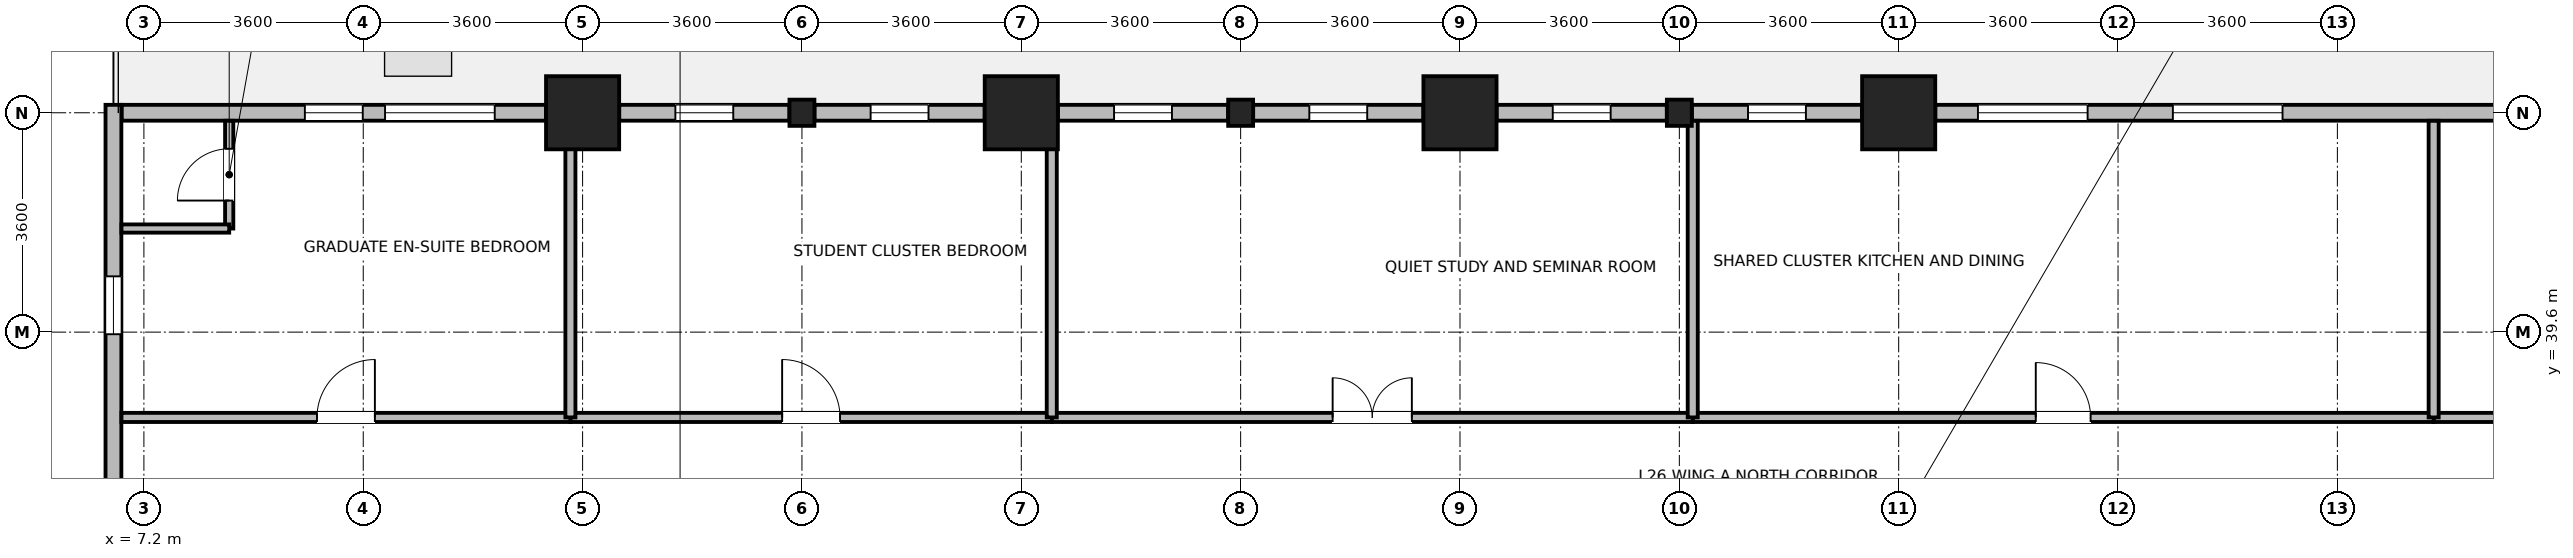
"""IFC4 building model, lengths in metres.
Left out: names, types, materials, properties, quantities, classifications, styles, units other than length and angle.
Written with IfcOpenShell. Run it as: python <this file> out.ifc"""

import sys

from ifc_helpers import new_model, si_unit, direction, frame, frame_2d, origin, origin_2d, place, context, subcontext, project, spatial, rectangle, i_section, extrude, source, transform, mapped, element, fill, save


model = new_model("IFC4")
c1 = context("Model", 3, precision=1e-05, world=origin(), true_north=direction((0.0, 1.0)))
c2 = subcontext(c1, "Body", "Model", "MODEL_VIEW")
j1 = project(units=[si_unit("LENGTHUNIT", "METRE"), si_unit("PLANEANGLEUNIT", "RADIAN")], contexts=[c1])
p1 = place(None, origin())
s1 = spatial("IfcSite", under=j1, at=p1, CompositionType="ELEMENT")
p2 = place(p1, origin())
s2 = spatial("IfcBuilding", under=s1, at=p2, CompositionType="ELEMENT")
p3 = place(p2, frame((0.0, 0.0, 104.5)))
s3 = spatial("IfcBuildingStorey", under=s2, at=p3, CompositionType="ELEMENT", Elevation=104.5)
m1 = source(origin(), c2, "Body", "SweptSolid", [
    extrude(rectangle(XDim=1.2, YDim=1.2, at=origin_2d()), origin(), (0.0, 0.0, 1.0), 3.7),
])
for number, where, z_axis, x_axis in (
    (1, (14.4, 43.2, 0.0), (0.0, 0.0, 1.0), (1.0, 0.0, 0.0)),
    (2, (21.6, 43.2, 0.0), (0.0, 0.0, 1.0), (1.0, 0.0, 0.0)),
    (3, (28.8, 43.2, 0.0), (0.0, 0.0, 1.0), (1.0, 0.0, 0.0)),
    (4, (36.0, 43.2, 0.0), (0.0, 0.0, 1.0), (1.0, 0.0, 0.0)),
):
    element("IfcColumn", number, at=place(p3, frame(where, z_axis=z_axis, x_axis=x_axis)), inside=s3, PredefinedType="COLUMN", context=c2, shape_type="MappedRepresentation", body=[
        mapped(m1, transform((0.0, 0.0, 0.0), x_axis=(1.0, 0.0, 0.0), y_axis=(0.0, 1.0, 0.0), z_axis=(0.0, 0.0, 1.0), scale=1.0)),
    ])
m2 = source(origin(), c2, "Body", "SweptSolid", [
    extrude(i_section(OverallWidth=0.409, OverallDepth=0.43, WebThickness=0.024, FlangeThickness=0.033, FilletRadius=0.015, at=origin_2d()), origin(), (0.0, 0.0, 1.0), 3.7),
])
for number, where, z_axis, x_axis in (
    (5, (18.0, 43.2, 0.0), (0.0, 0.0, 1.0), (1.0, 0.0, 0.0)),
    (6, (25.2, 43.2, 0.0), (0.0, 0.0, 1.0), (1.0, 0.0, 0.0)),
    (7, (32.4, 43.2, 0.0), (0.0, 0.0, 1.0), (1.0, 0.0, 0.0)),
):
    element("IfcColumn", number, at=place(p3, frame(where, z_axis=z_axis, x_axis=x_axis)), inside=s3, PredefinedType="COLUMN", context=c2, shape_type="MappedRepresentation", body=[
        mapped(m2, transform((0.0, 0.0, 0.0), x_axis=(1.0, 0.0, 0.0), y_axis=(0.0, 1.0, 0.0), z_axis=(0.0, 0.0, 1.0), scale=1.0)),
    ])
p4 = place(p3, frame((36.601, 43.2, 0.0), z_axis=(0.0, 0.0, 1.0), x_axis=(1.0, 0.0, 0.0)))
e8 = element("IfcWall", 8, at=p4, inside=s3, PredefinedType="STANDARD", context=c2, shape_type="SweptSolid", body=[
    extrude(rectangle(XDim=9.598, YDim=0.26, at=frame_2d((4.799, 0.0))), origin(), (0.0, 0.0, 1.0), 2.98),
])
p5 = place(p4, frame((0.7, 0.0, 0.85)))
e9 = element("IfcOpeningElement", 9, at=p5, cuts=e8, PredefinedType="OPENING", context=c2, shape_type="SweptSolid", body=[
    extrude(rectangle(XDim=1.8, YDim=1.85, at=frame_2d((0.9, 0.925))), frame((0.0, 0.14, 0.0), z_axis=(0.0, -1.0, 0.0), x_axis=(1.0, 0.0, 0.0)), (0.0, 0.0, 1.0), 0.28),
])
p6 = place(p4, frame((3.899, 0.0, 0.85)))
e10 = element("IfcOpeningElement", 10, at=p6, cuts=e8, PredefinedType="OPENING", context=c2, shape_type="SweptSolid", body=[
    extrude(rectangle(XDim=1.8, YDim=1.85, at=frame_2d((0.9, 0.925))), frame((0.0, 0.14, 0.0), z_axis=(0.0, -1.0, 0.0), x_axis=(1.0, 0.0, 0.0)), (0.0, 0.0, 1.0), 0.28),
])
p7 = place(p3, frame((32.605, 43.2, 0.0), z_axis=(0.0, 0.0, 1.0), x_axis=(1.0, 0.0, 0.0)))
e11 = element("IfcWall", 11, at=p7, inside=s3, PredefinedType="STANDARD", context=c2, shape_type="SweptSolid", body=[
    extrude(rectangle(XDim=2.793, YDim=0.26, at=frame_2d((1.397, 0.0))), origin(), (0.0, 0.0, 1.0), 2.98),
])
p8 = place(p7, frame((0.922, 0.0, 0.85)))
e12 = element("IfcOpeningElement", 12, at=p8, cuts=e11, PredefinedType="OPENING", context=c2, shape_type="SweptSolid", body=[
    extrude(rectangle(XDim=0.95, YDim=1.75, at=frame_2d((0.475, 0.875))), frame((0.0, 0.14, 0.0), z_axis=(0.0, -1.0, 0.0), x_axis=(1.0, 0.0, 0.0)), (0.0, 0.0, 1.0), 0.28),
])
p9 = place(p3, frame((29.401, 43.2, 0.0), z_axis=(0.0, 0.0, 1.0), x_axis=(1.0, 0.0, 0.0)))
e13 = element("IfcWall", 13, at=p9, inside=s3, PredefinedType="STANDARD", context=c2, shape_type="SweptSolid", body=[
    extrude(rectangle(XDim=2.794, YDim=0.26, at=frame_2d((1.397, 0.0))), origin(), (0.0, 0.0, 1.0), 2.98),
])
p10 = place(p9, frame((0.922, 0.0, 0.85)))
e14 = element("IfcOpeningElement", 14, at=p10, cuts=e13, PredefinedType="OPENING", context=c2, shape_type="SweptSolid", body=[
    extrude(rectangle(XDim=0.95, YDim=1.75, at=frame_2d((0.475, 0.875))), frame((0.0, 0.14, 0.0), z_axis=(0.0, -1.0, 0.0), x_axis=(1.0, 0.0, 0.0)), (0.0, 0.0, 1.0), 0.28),
])
p11 = place(p3, frame((25.406, 43.2, 0.0), z_axis=(0.0, 0.0, 1.0), x_axis=(1.0, 0.0, 0.0)))
e15 = element("IfcWall", 15, at=p11, inside=s3, PredefinedType="STANDARD", context=c2, shape_type="SweptSolid", body=[
    extrude(rectangle(XDim=2.793, YDim=0.26, at=frame_2d((1.397, 0.0))), origin(), (0.0, 0.0, 1.0), 2.98),
])
p12 = place(p11, frame((0.922, 0.0, 0.85)))
e16 = element("IfcOpeningElement", 16, at=p12, cuts=e15, PredefinedType="OPENING", context=c2, shape_type="SweptSolid", body=[
    extrude(rectangle(XDim=0.95, YDim=1.75, at=frame_2d((0.475, 0.875))), frame((0.0, 0.14, 0.0), z_axis=(0.0, -1.0, 0.0), x_axis=(1.0, 0.0, 0.0)), (0.0, 0.0, 1.0), 0.28),
])
p13 = place(p3, frame((22.201, 43.2, 0.0), z_axis=(0.0, 0.0, 1.0), x_axis=(1.0, 0.0, 0.0)))
e17 = element("IfcWall", 17, at=p13, inside=s3, PredefinedType="STANDARD", context=c2, shape_type="SweptSolid", body=[
    extrude(rectangle(XDim=2.793, YDim=0.26, at=frame_2d((1.397, 0.0))), origin(), (0.0, 0.0, 1.0), 2.98),
])
p14 = place(p13, frame((0.922, 0.0, 0.85)))
e18 = element("IfcOpeningElement", 18, at=p14, cuts=e17, PredefinedType="OPENING", context=c2, shape_type="SweptSolid", body=[
    extrude(rectangle(XDim=0.95, YDim=1.75, at=frame_2d((0.475, 0.875))), frame((0.0, 0.14, 0.0), z_axis=(0.0, -1.0, 0.0), x_axis=(1.0, 0.0, 0.0)), (0.0, 0.0, 1.0), 0.28),
])
p15 = place(p3, frame((18.206, 43.2, 0.0), z_axis=(0.0, 0.0, 1.0), x_axis=(1.0, 0.0, 0.0)))
e19 = element("IfcWall", 19, at=p15, inside=s3, PredefinedType="STANDARD", context=c2, shape_type="SweptSolid", body=[
    extrude(rectangle(XDim=2.793, YDim=0.26, at=frame_2d((1.397, 0.0))), origin(), (0.0, 0.0, 1.0), 2.98),
])
p16 = place(p15, frame((0.922, 0.0, 0.85)))
e20 = element("IfcOpeningElement", 20, at=p16, cuts=e19, PredefinedType="OPENING", context=c2, shape_type="SweptSolid", body=[
    extrude(rectangle(XDim=0.95, YDim=1.75, at=frame_2d((0.475, 0.875))), frame((0.0, 0.14, 0.0), z_axis=(0.0, -1.0, 0.0), x_axis=(1.0, 0.0, 0.0)), (0.0, 0.0, 1.0), 0.28),
])
p17 = place(p3, frame((15.001, 43.2, 0.0), z_axis=(0.0, 0.0, 1.0), x_axis=(1.0, 0.0, 0.0)))
e21 = element("IfcWall", 21, at=p17, inside=s3, PredefinedType="STANDARD", context=c2, shape_type="SweptSolid", body=[
    extrude(rectangle(XDim=2.793, YDim=0.26, at=frame_2d((1.397, 0.0))), origin(), (0.0, 0.0, 1.0), 2.98),
])
p18 = place(p17, frame((0.922, 0.0, 0.85)))
e22 = element("IfcOpeningElement", 22, at=p18, cuts=e21, PredefinedType="OPENING", context=c2, shape_type="SweptSolid", body=[
    extrude(rectangle(XDim=0.95, YDim=1.75, at=frame_2d((0.475, 0.875))), frame((0.0, 0.14, 0.0), z_axis=(0.0, -1.0, 0.0), x_axis=(1.0, 0.0, 0.0)), (0.0, 0.0, 1.0), 0.28),
])
p19 = place(p3, frame((6.835, 43.2, 0.0), z_axis=(0.0, 0.0, 1.0), x_axis=(1.0, 0.0, 0.0)))
e23 = element("IfcWall", 23, at=p19, inside=s3, PredefinedType="STANDARD", context=c2, shape_type="SweptSolid", body=[
    extrude(rectangle(XDim=6.964, YDim=0.26, at=frame_2d((3.482, 0.0))), origin(), (0.0, 0.0, 1.0), 3.43),
])
p20 = place(p19, frame((4.323, 0.0, 0.85)))
e24 = element("IfcOpeningElement", 24, at=p20, cuts=e23, PredefinedType="OPENING", context=c2, shape_type="SweptSolid", body=[
    extrude(rectangle(XDim=1.8, YDim=1.85, at=frame_2d((0.9, 0.925))), frame((0.0, 0.14, 0.0), z_axis=(0.0, -1.0, 0.0), x_axis=(1.0, 0.0, 0.0)), (0.0, 0.0, 1.0), 0.28),
])
p21 = place(p19, frame((3.007, 0.0, 0.85)))
e25 = element("IfcOpeningElement", 25, at=p21, cuts=e23, PredefinedType="OPENING", context=c2, shape_type="SweptSolid", body=[
    extrude(rectangle(XDim=0.95, YDim=1.75, at=frame_2d((0.475, 0.875))), frame((0.0, 0.14, 0.0), z_axis=(0.0, -1.0, 0.0), x_axis=(1.0, 0.0, 0.0)), (0.0, 0.0, 1.0), 0.28),
])
p22 = place(p3, frame((6.7, 36.751, 0.0), z_axis=(0.0, 0.0, 1.0), x_axis=(0.0, 1.0, 0.0)))
e26 = element("IfcWall", 26, at=p22, inside=s3, PredefinedType="STANDARD", context=c2, shape_type="SweptSolid", body=[
    extrude(rectangle(XDim=6.579, YDim=0.26, at=frame_2d((3.29, 0.0))), origin(), (0.0, 0.0, 1.0), 3.43),
])
p23 = place(p22, frame((2.814, 0.0, 0.85)))
e27 = element("IfcOpeningElement", 27, at=p23, cuts=e26, PredefinedType="OPENING", context=c2, shape_type="SweptSolid", body=[
    extrude(rectangle(XDim=0.95, YDim=1.75, at=frame_2d((0.475, 0.875))), frame((0.0, 0.14, 0.0), z_axis=(0.0, -1.0, 0.0), x_axis=(1.0, 0.0, 0.0)), (0.0, 0.0, 1.0), 0.28),
])
p24 = place(p3, frame((8.6, 41.3, 0.0), z_axis=(0.0, 0.0, 1.0), x_axis=(0.0, 1.0, 0.0)))
e28 = element("IfcWall", 28, at=p24, inside=s3, PredefinedType="PARTITIONING", context=c2, shape_type="SweptSolid", body=[
    extrude(rectangle(XDim=1.768, YDim=0.135, at=frame_2d((0.884, 0.0))), origin(), (0.0, 0.0, 1.0), 3.43),
])
p25 = place(p24, frame((0.459, 0.0, 0.0)))
e29 = element("IfcOpeningElement", 29, at=p25, cuts=e28, PredefinedType="OPENING", context=c2, shape_type="SweptSolid", body=[
    extrude(rectangle(XDim=0.85, YDim=2.04, at=frame_2d((0.425, 1.02))), frame((0.0, 0.078, 0.0), z_axis=(0.0, -1.0, 0.0), x_axis=(1.0, 0.0, 0.0)), (0.0, 0.0, 1.0), 0.155),
])
p26 = place(p3, frame((6.832, 41.3, 0.0), z_axis=(0.0, 0.0, 1.0), x_axis=(1.0, 0.0, 0.0)))
e30 = element("IfcWall", 30, at=p26, inside=s3, PredefinedType="PARTITIONING", context=c2, shape_type="SweptSolid", body=[
    extrude(rectangle(XDim=1.768, YDim=0.135, at=frame_2d((0.884, 0.0))), origin(), (0.0, 0.0, 1.0), 3.43),
])
p27 = place(p3, frame((44.78, 38.2, 0.0), z_axis=(0.0, 0.0, 1.0), x_axis=(1.0, 0.0, 0.0)))
e31 = element("IfcWall", 31, at=p27, inside=s3, PredefinedType="PARTITIONING", context=c2, shape_type="SweptSolid", body=[
    extrude(rectangle(XDim=14.06, YDim=0.15, at=frame_2d((7.03, 0.0))), origin(), (0.0, 0.0, 1.0), 3.43),
])
p28 = place(p27, frame((6.38, 0.0, 0.0)))
e32 = element("IfcOpeningElement", 32, at=p28, cuts=e31, PredefinedType="OPENING", context=c2, shape_type="SweptSolid", body=[
    extrude(rectangle(XDim=1.3, YDim=2.12, at=frame_2d((0.65, 1.06))), frame((0.0, 0.085, 0.0), z_axis=(0.0, -1.0, 0.0), x_axis=(1.0, 0.0, 0.0)), (0.0, 0.0, 1.0), 0.17),
])
p29 = place(p3, frame((32.62, 38.2, 0.0), z_axis=(0.0, 0.0, 1.0), x_axis=(1.0, 0.0, 0.0)))
e33 = element("IfcWall", 33, at=p29, inside=s3, PredefinedType="PARTITIONING", context=c2, shape_type="SweptSolid", body=[
    extrude(rectangle(XDim=12.16, YDim=0.15, at=frame_2d((6.08, 0.0))), origin(), (0.0, 0.0, 1.0), 3.43),
])
p30 = place(p29, frame((5.63, 0.0, 0.0)))
e34 = element("IfcOpeningElement", 34, at=p30, cuts=e33, PredefinedType="OPENING", context=c2, shape_type="SweptSolid", body=[
    extrude(rectangle(XDim=0.9, YDim=2.08, at=frame_2d((0.45, 1.04))), frame((0.0, 0.085, 0.0), z_axis=(0.0, -1.0, 0.0), x_axis=(1.0, 0.0, 0.0)), (0.0, 0.0, 1.0), 0.17),
])
p31 = place(p3, frame((22.1, 38.2, 0.0), z_axis=(0.0, 0.0, 1.0), x_axis=(1.0, 0.0, 0.0)))
e35 = element("IfcWall", 35, at=p31, inside=s3, PredefinedType="PARTITIONING", context=c2, shape_type="SweptSolid", body=[
    extrude(rectangle(XDim=10.52, YDim=0.15, at=frame_2d((5.26, 0.0))), origin(), (0.0, 0.0, 1.0), 3.43),
])
p32 = place(p31, frame((4.61, 0.0, 0.0)))
e36 = element("IfcOpeningElement", 36, at=p32, cuts=e35, PredefinedType="OPENING", context=c2, shape_type="SweptSolid", body=[
    extrude(rectangle(XDim=1.3, YDim=2.12, at=frame_2d((0.65, 1.06))), frame((0.0, 0.085, 0.0), z_axis=(0.0, -1.0, 0.0), x_axis=(1.0, 0.0, 0.0)), (0.0, 0.0, 1.0), 0.17),
])
p33 = place(p3, frame((14.2, 38.2, 0.0), z_axis=(0.0, 0.0, 1.0), x_axis=(1.0, 0.0, 0.0)))
e37 = element("IfcWall", 37, at=p33, inside=s3, PredefinedType="PARTITIONING", context=c2, shape_type="SweptSolid", body=[
    extrude(rectangle(XDim=7.9, YDim=0.15, at=frame_2d((3.95, 0.0))), origin(), (0.0, 0.0, 1.0), 3.43),
])
p34 = place(p33, frame((3.475, 0.0, 0.0)))
e38 = element("IfcOpeningElement", 38, at=p34, cuts=e37, PredefinedType="OPENING", context=c2, shape_type="SweptSolid", body=[
    extrude(rectangle(XDim=0.95, YDim=2.1, at=frame_2d((0.475, 1.05))), frame((0.0, 0.085, 0.0), z_axis=(0.0, -1.0, 0.0), x_axis=(1.0, 0.0, 0.0)), (0.0, 0.0, 1.0), 0.17),
])
p35 = place(p3, frame((6.832, 38.2, 0.0), z_axis=(0.0, 0.0, 1.0), x_axis=(1.0, 0.0, 0.0)))
e39 = element("IfcWall", 39, at=p35, inside=s3, PredefinedType="PARTITIONING", context=c2, shape_type="SweptSolid", body=[
    extrude(rectangle(XDim=7.368, YDim=0.15, at=frame_2d((3.684, 0.0))), origin(), (0.0, 0.0, 1.0), 3.43),
])
p36 = place(p35, frame((3.209, 0.0, 0.0)))
e40 = element("IfcOpeningElement", 40, at=p36, cuts=e39, PredefinedType="OPENING", context=c2, shape_type="SweptSolid", body=[
    extrude(rectangle(XDim=0.95, YDim=2.1, at=frame_2d((0.475, 1.05))), frame((0.0, 0.085, 0.0), z_axis=(0.0, -1.0, 0.0), x_axis=(1.0, 0.0, 0.0)), (0.0, 0.0, 1.0), 0.17),
])
p37 = place(p3, frame((14.2, 38.2, 0.0), z_axis=(0.0, 0.0, 1.0), x_axis=(0.0, 1.0, 0.0)))
e41 = element("IfcWall", 41, at=p37, inside=s3, PredefinedType="PARTITIONING", context=c2, shape_type="SweptSolid", body=[
    extrude(rectangle(XDim=4.868, YDim=0.165, at=frame_2d((2.434, 0.0))), origin(), (0.0, 0.0, 1.0), 2.93),
])
p38 = place(p3, frame((22.1, 38.2, 0.0), z_axis=(0.0, 0.0, 1.0), x_axis=(0.0, 1.0, 0.0)))
e42 = element("IfcWall", 42, at=p38, inside=s3, PredefinedType="PARTITIONING", context=c2, shape_type="SweptSolid", body=[
    extrude(rectangle(XDim=4.868, YDim=0.165, at=frame_2d((2.434, 0.0))), origin(), (0.0, 0.0, 1.0), 3.43),
])
p39 = place(p3, frame((32.62, 38.2, 0.0), z_axis=(0.0, 0.0, 1.0), x_axis=(0.0, 1.0, 0.0)))
e43 = element("IfcWall", 43, at=p39, inside=s3, PredefinedType="PARTITIONING", context=c2, shape_type="SweptSolid", body=[
    extrude(rectangle(XDim=4.868, YDim=0.165, at=frame_2d((2.434, 0.0))), origin(), (0.0, 0.0, 1.0), 3.1),
])
p40 = place(p3, frame((44.78, 38.2, 0.0), z_axis=(0.0, 0.0, 1.0), x_axis=(0.0, 1.0, 0.0)))
e44 = element("IfcWall", 44, at=p40, inside=s3, PredefinedType="PARTITIONING", context=c2, shape_type="SweptSolid", body=[
    extrude(rectangle(XDim=4.868, YDim=0.165, at=frame_2d((2.434, 0.0))), origin(), (0.0, 0.0, 1.0), 3.43),
])
p41 = place(p5, origin())
e45 = element("IfcWindow", 45, at=p41, inside=s3, PartitioningType="SINGLE_PANEL", PredefinedType="WINDOW", context=c2, shape_type="SweptSolid", body=[
    extrude(rectangle(XDim=1.8, YDim=1.85, at=frame_2d((0.9, 0.925))), frame((0.0, 0.03, 0.0), z_axis=(0.0, -1.0, 0.0), x_axis=(1.0, 0.0, 0.0)), (0.0, 0.0, 1.0), 0.06),
])
fill(e9, e45)
p42 = place(p6, origin())
e46 = element("IfcWindow", 46, at=p42, inside=s3, PartitioningType="SINGLE_PANEL", PredefinedType="WINDOW", context=c2, shape_type="SweptSolid", body=[
    extrude(rectangle(XDim=1.8, YDim=1.85, at=frame_2d((0.9, 0.925))), frame((0.0, 0.03, 0.0), z_axis=(0.0, -1.0, 0.0), x_axis=(1.0, 0.0, 0.0)), (0.0, 0.0, 1.0), 0.06),
])
fill(e10, e46)
p43 = place(p8, origin())
e47 = element("IfcWindow", 47, at=p43, inside=s3, PartitioningType="SINGLE_PANEL", PredefinedType="WINDOW", context=c2, shape_type="SweptSolid", body=[
    extrude(rectangle(XDim=0.95, YDim=1.75, at=frame_2d((0.475, 0.875))), frame((0.0, 0.03, 0.0), z_axis=(0.0, -1.0, 0.0), x_axis=(1.0, 0.0, 0.0)), (0.0, 0.0, 1.0), 0.06),
])
fill(e12, e47)
p44 = place(p10, origin())
e48 = element("IfcWindow", 48, at=p44, inside=s3, PartitioningType="SINGLE_PANEL", PredefinedType="WINDOW", context=c2, shape_type="SweptSolid", body=[
    extrude(rectangle(XDim=0.95, YDim=1.75, at=frame_2d((0.475, 0.875))), frame((0.0, 0.03, 0.0), z_axis=(0.0, -1.0, 0.0), x_axis=(1.0, 0.0, 0.0)), (0.0, 0.0, 1.0), 0.06),
])
fill(e14, e48)
p45 = place(p12, origin())
e49 = element("IfcWindow", 49, at=p45, inside=s3, PartitioningType="SINGLE_PANEL", PredefinedType="WINDOW", context=c2, shape_type="SweptSolid", body=[
    extrude(rectangle(XDim=0.95, YDim=1.75, at=frame_2d((0.475, 0.875))), frame((0.0, 0.03, 0.0), z_axis=(0.0, -1.0, 0.0), x_axis=(1.0, 0.0, 0.0)), (0.0, 0.0, 1.0), 0.06),
])
fill(e16, e49)
p46 = place(p14, origin())
e50 = element("IfcWindow", 50, at=p46, inside=s3, PartitioningType="SINGLE_PANEL", PredefinedType="WINDOW", context=c2, shape_type="SweptSolid", body=[
    extrude(rectangle(XDim=0.95, YDim=1.75, at=frame_2d((0.475, 0.875))), frame((0.0, 0.03, 0.0), z_axis=(0.0, -1.0, 0.0), x_axis=(1.0, 0.0, 0.0)), (0.0, 0.0, 1.0), 0.06),
])
fill(e18, e50)
p47 = place(p16, origin())
e51 = element("IfcWindow", 51, at=p47, inside=s3, PartitioningType="SINGLE_PANEL", PredefinedType="WINDOW", context=c2, shape_type="SweptSolid", body=[
    extrude(rectangle(XDim=0.95, YDim=1.75, at=frame_2d((0.475, 0.875))), frame((0.0, 0.03, 0.0), z_axis=(0.0, -1.0, 0.0), x_axis=(1.0, 0.0, 0.0)), (0.0, 0.0, 1.0), 0.06),
])
fill(e20, e51)
p48 = place(p18, origin())
e52 = element("IfcWindow", 52, at=p48, inside=s3, PartitioningType="SINGLE_PANEL", PredefinedType="WINDOW", context=c2, shape_type="SweptSolid", body=[
    extrude(rectangle(XDim=0.95, YDim=1.75, at=frame_2d((0.475, 0.875))), frame((0.0, 0.03, 0.0), z_axis=(0.0, -1.0, 0.0), x_axis=(1.0, 0.0, 0.0)), (0.0, 0.0, 1.0), 0.06),
])
fill(e22, e52)
p49 = place(p20, origin())
e53 = element("IfcWindow", 53, at=p49, inside=s3, PartitioningType="SINGLE_PANEL", PredefinedType="WINDOW", context=c2, shape_type="SweptSolid", body=[
    extrude(rectangle(XDim=1.8, YDim=1.85, at=frame_2d((0.9, 0.925))), frame((0.0, 0.03, 0.0), z_axis=(0.0, -1.0, 0.0), x_axis=(1.0, 0.0, 0.0)), (0.0, 0.0, 1.0), 0.06),
])
fill(e24, e53)
p50 = place(p21, origin())
e54 = element("IfcWindow", 54, at=p50, inside=s3, PartitioningType="SINGLE_PANEL", PredefinedType="WINDOW", context=c2, shape_type="SweptSolid", body=[
    extrude(rectangle(XDim=0.95, YDim=1.75, at=frame_2d((0.475, 0.875))), frame((0.0, 0.03, 0.0), z_axis=(0.0, -1.0, 0.0), x_axis=(1.0, 0.0, 0.0)), (0.0, 0.0, 1.0), 0.06),
])
fill(e25, e54)
p51 = place(p23, origin())
e55 = element("IfcWindow", 55, at=p51, inside=s3, PartitioningType="SINGLE_PANEL", PredefinedType="WINDOW", context=c2, shape_type="SweptSolid", body=[
    extrude(rectangle(XDim=0.95, YDim=1.75, at=frame_2d((0.475, 0.875))), frame((0.0, 0.03, 0.0), z_axis=(0.0, -1.0, 0.0), x_axis=(1.0, 0.0, 0.0)), (0.0, 0.0, 1.0), 0.06),
])
fill(e27, e55)
p52 = place(p25, origin())
e56 = element("IfcDoor", 56, at=p52, inside=s3, OperationType="SINGLE_SWING_LEFT", PredefinedType="DOOR", context=c2, shape_type="SweptSolid", body=[
    extrude(rectangle(XDim=0.85, YDim=2.04, at=frame_2d((0.425, 1.02))), frame((0.0, 0.025, 0.0), z_axis=(0.0, -1.0, 0.0), x_axis=(1.0, 0.0, 0.0)), (0.0, 0.0, 1.0), 0.05),
])
fill(e29, e56)
p53 = place(p30, origin())
e57 = element("IfcDoor", 57, at=p53, inside=s3, OperationType="SINGLE_SWING_LEFT", PredefinedType="DOOR", context=c2, shape_type="SweptSolid", body=[
    extrude(rectangle(XDim=0.9, YDim=2.08, at=frame_2d((0.45, 1.04))), frame((0.0, 0.025, 0.0), z_axis=(0.0, -1.0, 0.0), x_axis=(1.0, 0.0, 0.0)), (0.0, 0.0, 1.0), 0.05),
])
fill(e34, e57)
p54 = place(p32, origin())
e58 = element("IfcDoor", 58, at=p54, inside=s3, OperationType="DOUBLE_DOOR_SINGLE_SWING", PredefinedType="DOOR", context=c2, shape_type="SweptSolid", body=[
    extrude(rectangle(XDim=1.3, YDim=2.12, at=frame_2d((0.65, 1.06))), frame((0.0, 0.025, 0.0), z_axis=(0.0, -1.0, 0.0), x_axis=(1.0, 0.0, 0.0)), (0.0, 0.0, 1.0), 0.05),
])
fill(e36, e58)
p55 = place(p34, origin())
e59 = element("IfcDoor", 59, at=p55, inside=s3, OperationType="SINGLE_SWING_LEFT", PredefinedType="DOOR", context=c2, shape_type="SweptSolid", body=[
    extrude(rectangle(XDim=0.95, YDim=2.1, at=frame_2d((0.475, 1.05))), frame((0.0, 0.025, 0.0), z_axis=(0.0, -1.0, 0.0), x_axis=(1.0, 0.0, 0.0)), (0.0, 0.0, 1.0), 0.05),
])
fill(e38, e59)
p56 = place(p36, origin())
e60 = element("IfcDoor", 60, at=p56, inside=s3, OperationType="SINGLE_SWING_RIGHT", PredefinedType="DOOR", context=c2, shape_type="SweptSolid", body=[
    extrude(rectangle(XDim=0.95, YDim=2.1, at=frame_2d((0.475, 1.05))), frame((0.0, 0.025, 0.0), z_axis=(0.0, -1.0, 0.0), x_axis=(1.0, 0.0, 0.0)), (0.0, 0.0, 1.0), 0.05),
])
fill(e40, e60)
save(model, sys.argv[1])
